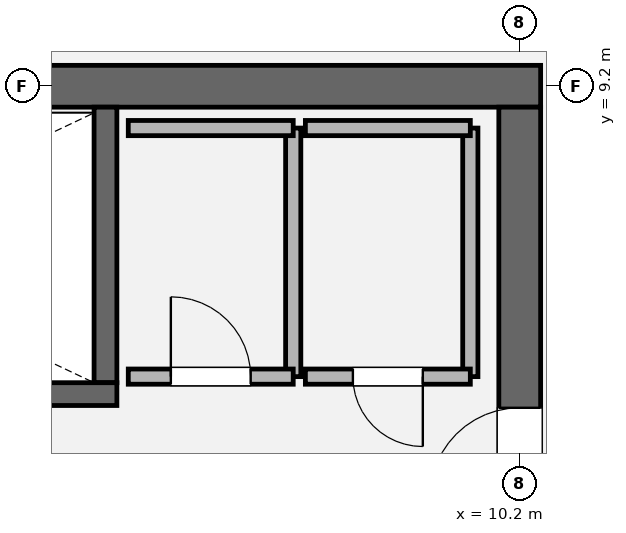
"""IFC4 building model, lengths in metres.
Left out: names, types, materials, properties, quantities, classifications, styles, units other than length and angle.
Written with IfcOpenShell. Run it as: python <this file> out.ifc"""

import sys

from ifc_helpers import new_model, si_unit, direction, frame, frame_2d, origin, place, context, subcontext, project, spatial, rectangle, extrude, element, fill, save


model = new_model("IFC4")
c1 = context("Model", 3, precision=1e-05, world=origin(), true_north=direction((0.0, 1.0)))
c2 = subcontext(c1, "Body", "Model", "MODEL_VIEW")
j1 = project(units=[si_unit("LENGTHUNIT", "METRE"), si_unit("PLANEANGLEUNIT", "RADIAN")], contexts=[c1])
p1 = place(None, origin())
s1 = spatial("IfcSite", under=j1, at=p1, CompositionType="ELEMENT")
p2 = place(p1, origin())
s2 = spatial("IfcBuilding", under=s1, at=p2, CompositionType="ELEMENT")
p3 = place(p2, frame((0.0, 0.0, 309.0)))
s3 = spatial("IfcBuildingStorey", under=s2, at=p3, CompositionType="ELEMENT", Elevation=309.0)
p4 = place(p3, frame((-10.475, 9.2, 0.0), z_axis=(0.0, 0.0, 1.0), x_axis=(1.0, 0.0, 0.0)))
e1 = element("IfcWall", 1, at=p4, inside=s3, PredefinedType="SHEAR", context=c2, shape_type="SweptSolid", body=[
    extrude(rectangle(XDim=20.95, YDim=0.55, at=frame_2d((10.475, 0.0))), origin(), (0.0, 0.0, 1.0), 4.2),
])
p5 = place(p3, frame((10.2, 8.925, 0.0), z_axis=(0.0, 0.0, 1.0), x_axis=(0.0, -1.0, 0.0)))
e2 = element("IfcWall", 2, at=p5, inside=s3, PredefinedType="SHEAR", context=c2, shape_type="SweptSolid", body=[
    extrude(rectangle(XDim=17.85, YDim=0.55, at=frame_2d((8.925, 0.0))), origin(), (0.0, 0.0, 1.0), 4.2),
])
p6 = place(p5, frame((3.955, 0.0, 0.0)))
e3 = element("IfcOpeningElement", 3, at=p6, cuts=e2, PredefinedType="OPENING", context=c2, shape_type="SweptSolid", body=[
    extrude(rectangle(XDim=1.18, YDim=2.2, at=frame_2d((0.59, 1.1))), frame((0.0, 0.285, 0.0), z_axis=(0.0, -1.0, 0.0), x_axis=(1.0, 0.0, 0.0)), (0.0, 0.0, 1.0), 0.57),
])
p7 = place(p3, frame((4.75, 8.925, 0.0), z_axis=(0.0, 0.0, 1.0), x_axis=(0.0, -1.0, 0.0)))
e4 = element("IfcWall", 4, at=p7, inside=s3, PredefinedType="SOLIDWALL", context=c2, shape_type="SweptSolid", body=[
    extrude(rectangle(XDim=3.625, YDim=0.3, at=frame_2d((1.812, 0.0))), origin(), (0.0, 0.0, 1.0), 4.2),
])
p8 = place(p3, frame((-4.9, 5.15, 0.0), z_axis=(0.0, 0.0, 1.0), x_axis=(1.0, 0.0, 0.0)))
e5 = element("IfcWall", 5, at=p8, inside=s3, PredefinedType="SOLIDWALL", context=c2, shape_type="SweptSolid", body=[
    extrude(rectangle(XDim=9.8, YDim=0.3, at=frame_2d((4.9, 0.0))), origin(), (0.0, 0.0, 1.0), 4.2),
])
p9 = place(p8, frame((0.56, 0.0, 0.0)))
e6 = element("IfcOpeningElement", 6, at=p9, cuts=e5, PredefinedType="OPENING", context=c2, shape_type="SweptSolid", body=[
    extrude(rectangle(XDim=1.18, YDim=2.2, at=frame_2d((0.59, 1.1))), frame((0.0, 0.16, 0.0), z_axis=(0.0, -1.0, 0.0), x_axis=(1.0, 0.0, 0.0)), (0.0, 0.0, 1.0), 0.32),
])
p10 = place(p3, frame((7.22, 5.38, 0.0), z_axis=(0.0, 0.0, 1.0), x_axis=(0.0, 1.0, 0.0)))
e7 = element("IfcWall", 7, at=p10, inside=s3, PredefinedType="SOLIDWALL", context=c2, shape_type="SweptSolid", body=[
    extrude(rectangle(XDim=3.27, YDim=0.2, at=frame_2d((1.635, 0.0))), origin(), (0.0, 0.0, 1.0), 4.0),
])
p11 = place(p3, frame((7.22, 8.65, 0.0), z_axis=(0.0, 0.0, 1.0), x_axis=(-1.0, 0.0, 0.0)))
e8 = element("IfcWall", 8, at=p11, inside=s3, PredefinedType="SOLIDWALL", context=c2, shape_type="SweptSolid", body=[
    extrude(rectangle(XDim=2.17, YDim=0.2, at=frame_2d((1.085, 0.0))), origin(), (0.0, 0.0, 1.0), 4.0),
])
p12 = place(p3, frame((5.05, 5.38, 0.0), z_axis=(0.0, 0.0, 1.0), x_axis=(1.0, 0.0, 0.0)))
e9 = element("IfcWall", 9, at=p12, inside=s3, PredefinedType="SOLIDWALL", context=c2, shape_type="SweptSolid", body=[
    extrude(rectangle(XDim=2.17, YDim=0.2, at=frame_2d((1.085, 0.0))), origin(), (0.0, 0.0, 1.0), 4.0),
])
p13 = place(p12, frame((0.56, 0.0, 0.0)))
e10 = element("IfcOpeningElement", 10, at=p13, cuts=e9, PredefinedType="OPENING", context=c2, shape_type="SweptSolid", body=[
    extrude(rectangle(XDim=1.05, YDim=2.2, at=frame_2d((0.525, 1.1))), frame((0.0, 0.11, 0.0), z_axis=(0.0, -1.0, 0.0), x_axis=(1.0, 0.0, 0.0)), (0.0, 0.0, 1.0), 0.22),
])
p14 = place(p3, frame((9.55, 5.38, 0.0), z_axis=(0.0, 0.0, 1.0), x_axis=(0.0, 1.0, 0.0)))
e11 = element("IfcWall", 11, at=p14, inside=s3, PredefinedType="SOLIDWALL", context=c2, shape_type="SweptSolid", body=[
    extrude(rectangle(XDim=3.27, YDim=0.2, at=frame_2d((1.635, 0.0))), origin(), (0.0, 0.0, 1.0), 4.0),
])
p15 = place(p3, frame((9.55, 8.65, 0.0), z_axis=(0.0, 0.0, 1.0), x_axis=(-1.0, 0.0, 0.0)))
e12 = element("IfcWall", 12, at=p15, inside=s3, PredefinedType="SOLIDWALL", context=c2, shape_type="SweptSolid", body=[
    extrude(rectangle(XDim=2.17, YDim=0.2, at=frame_2d((1.085, 0.0))), origin(), (0.0, 0.0, 1.0), 4.0),
])
p16 = place(p3, frame((7.38, 5.38, 0.0), z_axis=(0.0, 0.0, 1.0), x_axis=(1.0, 0.0, 0.0)))
e13 = element("IfcWall", 13, at=p16, inside=s3, PredefinedType="SOLIDWALL", context=c2, shape_type="SweptSolid", body=[
    extrude(rectangle(XDim=2.17, YDim=0.2, at=frame_2d((1.085, 0.0))), origin(), (0.0, 0.0, 1.0), 4.0),
])
p17 = place(p16, frame((0.625, 0.0, 0.0)))
e14 = element("IfcOpeningElement", 14, at=p17, cuts=e13, PredefinedType="OPENING", context=c2, shape_type="SweptSolid", body=[
    extrude(rectangle(XDim=0.92, YDim=2.1, at=frame_2d((0.46, 1.05))), frame((0.0, 0.11, 0.0), z_axis=(0.0, -1.0, 0.0), x_axis=(1.0, 0.0, 0.0)), (0.0, 0.0, 1.0), 0.22),
])
p18 = place(p6, origin())
e15 = element("IfcDoor", 15, at=p18, inside=s3, OperationType="SINGLE_SWING_RIGHT", PredefinedType="DOOR", context=c2, shape_type="SweptSolid", body=[
    extrude(rectangle(XDim=1.18, YDim=2.2, at=frame_2d((0.59, 1.1))), frame((0.0, 0.025, 0.0), z_axis=(0.0, -1.0, 0.0), x_axis=(1.0, 0.0, 0.0)), (0.0, 0.0, 1.0), 0.05),
])
fill(e3, e15)
p19 = place(p13, origin())
e16 = element("IfcDoor", 16, at=p19, inside=s3, OperationType="SINGLE_SWING_LEFT", PredefinedType="DOOR", context=c2, shape_type="SweptSolid", body=[
    extrude(rectangle(XDim=1.05, YDim=2.2, at=frame_2d((0.525, 1.1))), frame((0.0, 0.025, 0.0), z_axis=(0.0, -1.0, 0.0), x_axis=(1.0, 0.0, 0.0)), (0.0, 0.0, 1.0), 0.05),
])
fill(e10, e16)
p20 = place(p17, origin())
e17 = element("IfcDoor", 17, at=p20, inside=s3, OperationType="SINGLE_SWING_RIGHT", PredefinedType="DOOR", context=c2, shape_type="SweptSolid", body=[
    extrude(rectangle(XDim=0.92, YDim=2.1, at=frame_2d((0.46, 1.05))), frame((0.0, 0.025, 0.0), z_axis=(0.0, -1.0, 0.0), x_axis=(1.0, 0.0, 0.0)), (0.0, 0.0, 1.0), 0.05),
])
fill(e14, e17)
save(model, sys.argv[1])
